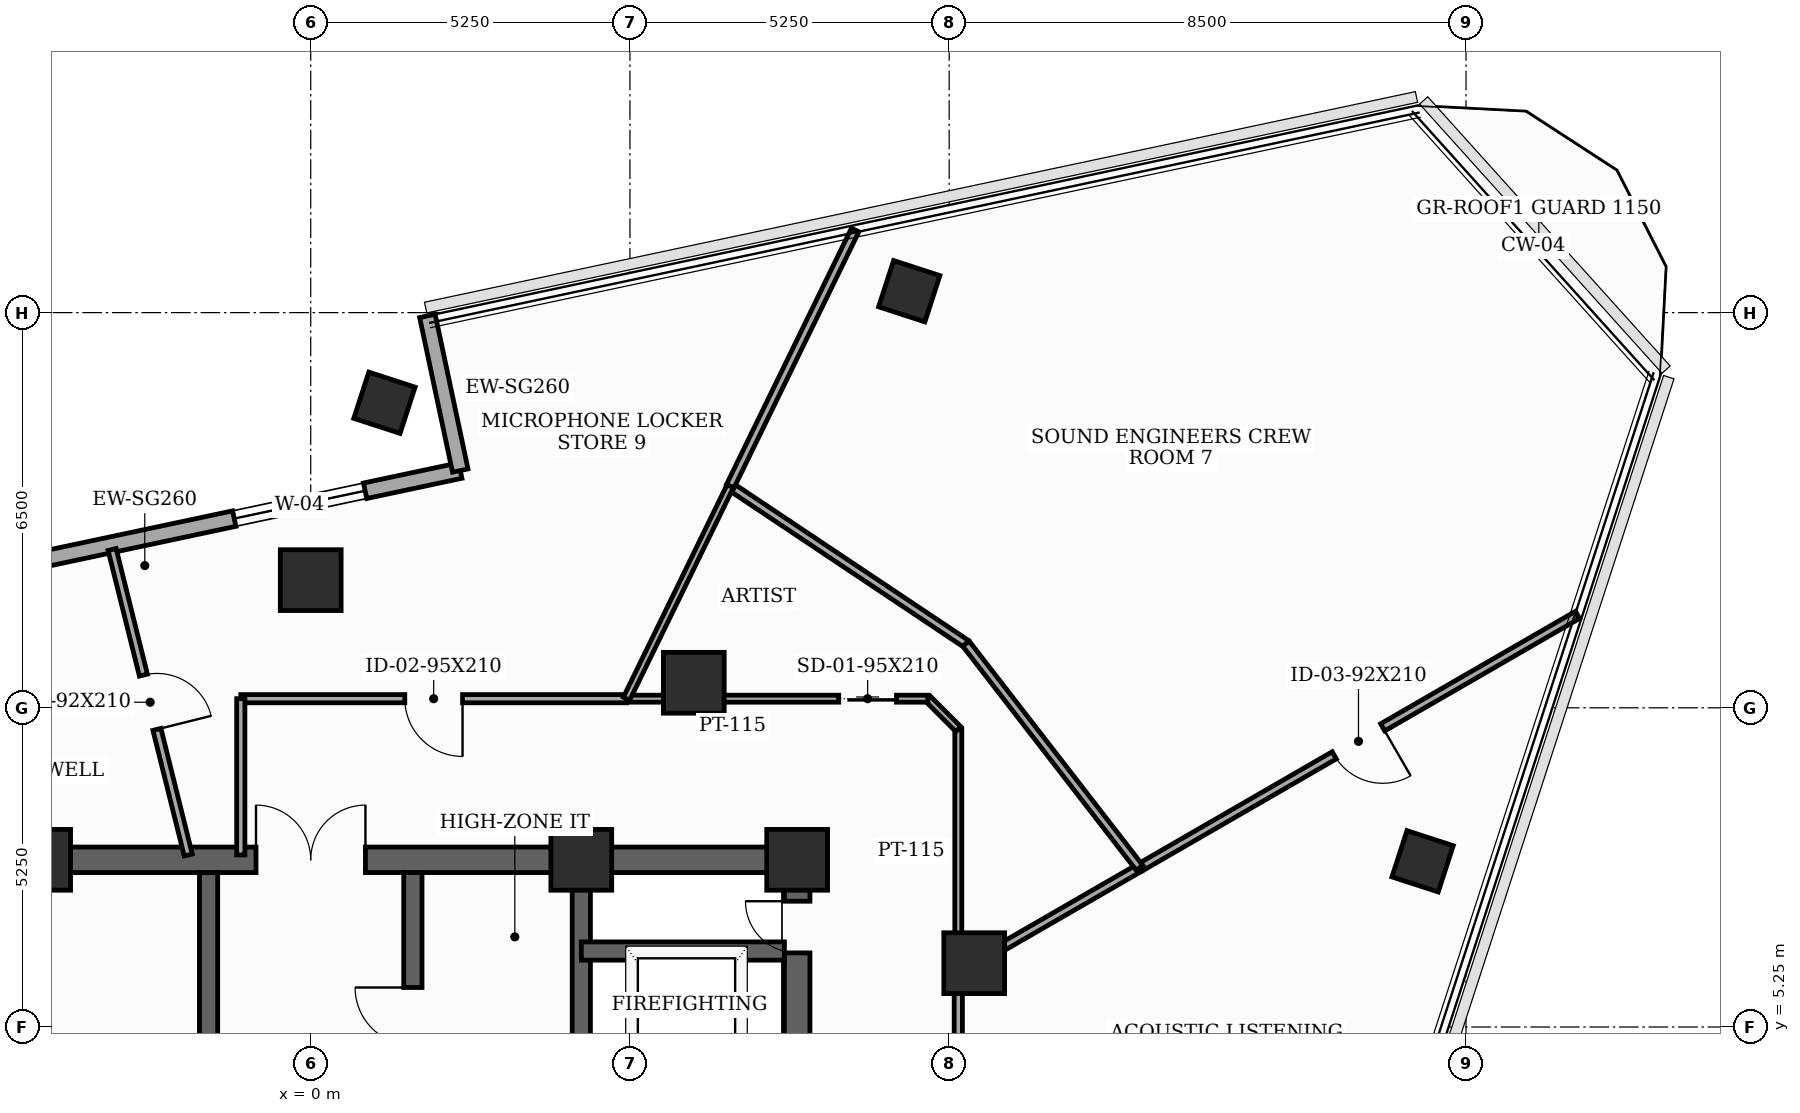
"""IFC4 building model, lengths in metres.
Left out: names, types, materials, properties, quantities, classifications, styles, units other than length and angle.
Written with IfcOpenShell. Run it as: python <this file> out.ifc"""

import sys

from ifc_helpers import new_model, si_unit, direction, frame, frame_2d, origin, origin_2d, place, context, subcontext, project, spatial, rectangle, extrude, element, fill, save


model = new_model("IFC4")
c1 = context("Model", 3, precision=1e-05, world=origin(), true_north=direction((0.0, 1.0)))
c2 = subcontext(c1, "Body", "Model", "MODEL_VIEW")
j1 = project(units=[si_unit("LENGTHUNIT", "METRE"), si_unit("PLANEANGLEUNIT", "RADIAN")], contexts=[c1])
p1 = place(None, origin())
s1 = spatial("IfcSite", under=j1, at=p1, CompositionType="ELEMENT")
p2 = place(p1, origin())
s2 = spatial("IfcBuilding", under=s1, at=p2, CompositionType="ELEMENT")
p3 = place(p2, frame((0.0, 0.0, 305.4)))
s3 = spatial("IfcBuildingStorey", under=s2, at=p3, CompositionType="ELEMENT", Elevation=305.4)
for number, where, z_axis, x_axis in (
    (1, (8.0, 8.0, 0.0), (0.0, 0.0, 1.0), (1.0, 0.0, 0.0)),
    (2, (4.45, 8.0, 0.0), (0.0, 0.0, 1.0), (1.0, 0.0, 0.0)),
    (3, (-4.45, 8.0, 0.0), (0.0, 0.0, 1.0), (1.0, 0.0, 0.0)),
    (4, (10.912, 6.3, 0.0), (0.0, 0.0, 1.0), (1.0, 0.0, 0.0)),
    (5, (6.3, 10.912, 0.0), (0.0, 0.0, 1.0), (1.0, 0.0, 0.0)),
    (6, (0.0, 12.6, 0.0), (0.0, 0.0, 1.0), (1.0, 0.0, 0.0)),
):
    element("IfcColumn", number, at=place(p3, frame(where, z_axis=z_axis, x_axis=x_axis)), inside=s3, PredefinedType="COLUMN", context=c2, shape_type="SweptSolid", body=[
        extrude(rectangle(XDim=1.0, YDim=1.0, at=origin_2d()), origin(), (0.0, 0.0, 1.0), 3.7),
    ])
for number, where, z_axis, x_axis in (
    (7, (18.286, 7.976, 0.0), (0.0, 0.0, 1.0), (0.309, 0.951, 0.0)),
    (8, (9.844, 17.352, 0.0), (0.0, 0.0, 1.0), (0.309, 0.951, 0.0)),
    (9, (1.212, 15.518, 0.0), (0.0, 0.0, 1.0), (0.309, 0.951, 0.0)),
):
    element("IfcColumn", number, at=place(p3, frame(where, z_axis=z_axis, x_axis=x_axis)), inside=s3, PredefinedType="COLUMN", context=c2, shape_type="SweptSolid", body=[
        extrude(rectangle(XDim=0.8, YDim=0.8, at=origin_2d()), origin(), (0.0, 0.0, 1.0), 3.7),
    ])
p4 = place(p3, frame((2.459, 14.402, 0.0), z_axis=(0.0, 0.0, 1.0), x_axis=(-0.978149082982, -0.207904717268, 0.0)))
e10 = element("IfcWall", 10, at=p4, inside=s3, PredefinedType="SOLIDWALL", context=c2, shape_type="SweptSolid", body=[
    extrude(rectangle(XDim=10.8, YDim=0.26, at=frame_2d((5.4, 0.0))), origin(), (0.0, 0.0, 1.0), 3.5),
])
p5 = place(p4, frame((1.6, 0.0, 0.85)))
e11 = element("IfcOpeningElement", 11, at=p5, cuts=e10, PredefinedType="OPENING", context=c2, shape_type="SweptSolid", body=[
    extrude(rectangle(XDim=2.2, YDim=1.25, at=frame_2d((1.1, 0.625))), frame((0.0, 0.14, 0.0), z_axis=(0.0, -1.0, 0.0), x_axis=(1.0, 0.0, 0.0)), (0.0, 0.0, 1.0), 0.28),
])
p6 = place(p4, frame((7.0, 0.0, 0.85)))
e12 = element("IfcOpeningElement", 12, at=p6, cuts=e10, PredefinedType="OPENING", context=c2, shape_type="SweptSolid", body=[
    extrude(rectangle(XDim=2.2, YDim=1.25, at=frame_2d((1.1, 0.625))), frame((0.0, 0.14, 0.0), z_axis=(0.0, -1.0, 0.0), x_axis=(1.0, 0.0, 0.0)), (0.0, 0.0, 1.0), 0.28),
])
p7 = place(p3, frame((1.919, 16.946, 0.0), z_axis=(0.0, 0.0, 1.0), x_axis=(0.207893569688, -0.978151452323, 0.0)))
e13 = element("IfcWall", 13, at=p7, inside=s3, PredefinedType="SOLIDWALL", context=c2, shape_type="SweptSolid", body=[
    extrude(rectangle(XDim=2.6, YDim=0.26, at=frame_2d((1.3, 0.0))), origin(), (0.0, 0.0, 1.0), 3.5),
])
p8 = place(p3, frame((8.0, -8.0, 0.0), z_axis=(0.0, 0.0, 1.0), x_axis=(0.0, 1.0, 0.0)))
e14 = element("IfcWall", 14, at=p8, inside=s3, PredefinedType="SHEAR", context=c2, shape_type="SweptSolid", body=[
    extrude(rectangle(XDim=16.0, YDim=0.42, at=frame_2d((8.0, 0.0))), origin(), (0.0, 0.0, 1.0), 3.5),
])
p9 = place(p8, frame((9.6, 0.0, 0.0)))
e15 = element("IfcOpeningElement", 15, at=p9, cuts=e14, PredefinedType="OPENING", context=c2, shape_type="SweptSolid", body=[
    extrude(rectangle(XDim=1.05, YDim=2.15, at=frame_2d((0.525, 1.075))), frame((0.0, 0.22, 0.0), z_axis=(0.0, -1.0, 0.0), x_axis=(1.0, 0.0, 0.0)), (0.0, 0.0, 1.0), 0.44),
])
p10 = place(p8, frame((14.469, 0.0, 0.0)))
e16 = element("IfcOpeningElement", 16, at=p10, cuts=e14, PredefinedType="OPENING", context=c2, shape_type="SweptSolid", body=[
    extrude(rectangle(XDim=0.85, YDim=2.02, at=frame_2d((0.425, 1.01))), frame((0.0, 0.22, 0.0), z_axis=(0.0, -1.0, 0.0), x_axis=(1.0, 0.0, 0.0)), (0.0, 0.0, 1.0), 0.44),
])
p11 = place(p3, frame((-8.0, 8.0, 0.0), z_axis=(0.0, 0.0, 1.0), x_axis=(1.0, 0.0, 0.0)))
e17 = element("IfcWall", 17, at=p11, inside=s3, PredefinedType="SHEAR", context=c2, shape_type="SweptSolid", body=[
    extrude(rectangle(XDim=16.0, YDim=0.42, at=frame_2d((8.0, 0.0))), origin(), (0.0, 0.0, 1.0), 3.5),
])
p12 = place(p11, frame((7.1, 0.0, 0.0)))
e18 = element("IfcOpeningElement", 18, at=p12, cuts=e17, PredefinedType="OPENING", context=c2, shape_type="SweptSolid", body=[
    extrude(rectangle(XDim=1.8, YDim=2.15, at=frame_2d((0.9, 1.075))), frame((0.0, 0.22, 0.0), z_axis=(0.0, -1.0, 0.0), x_axis=(1.0, 0.0, 0.0)), (0.0, 0.0, 1.0), 0.44),
])
p13 = place(p3, frame((4.45, -7.79, 0.0), z_axis=(0.0, 0.0, 1.0), x_axis=(0.0, 1.0, 0.0)))
e19 = element("IfcWall", 19, at=p13, inside=s3, PredefinedType="SHEAR", context=c2, shape_type="SweptSolid", body=[
    extrude(rectangle(XDim=15.58, YDim=0.3, at=frame_2d((7.79, 0.0))), origin(), (0.0, 0.0, 1.0), 3.5),
])
p14 = place(p3, frame((4.45, 6.5, 0.0), z_axis=(0.0, 0.0, 1.0), x_axis=(1.0, 0.0, 0.0)))
e20 = element("IfcWall", 20, at=p14, inside=s3, PredefinedType="SHEAR", context=c2, shape_type="SweptSolid", body=[
    extrude(rectangle(XDim=3.34, YDim=0.3, at=frame_2d((1.67, 0.0))), origin(), (0.0, 0.0, 1.0), 3.5),
])
p15 = place(p3, frame((-1.68, -4.85, 0.0), z_axis=(0.0, 0.0, 1.0), x_axis=(0.0, 1.0, 0.0)))
e21 = element("IfcWall", 21, at=p15, inside=s3, PredefinedType="SHEAR", context=c2, shape_type="SweptSolid", body=[
    extrude(rectangle(XDim=12.64, YDim=0.3, at=frame_2d((6.32, 0.0))), origin(), (0.0, 0.0, 1.0), 3.5),
])
p16 = place(p15, frame((1.05, 0.0, 0.0)))
e22 = element("IfcOpeningElement", 22, at=p16, cuts=e21, PredefinedType="OPENING", context=c2, shape_type="SweptSolid", body=[
    extrude(rectangle(XDim=0.85, YDim=2.02, at=frame_2d((0.425, 1.01))), frame((0.0, 0.16, 0.0), z_axis=(0.0, -1.0, 0.0), x_axis=(1.0, 0.0, 0.0)), (0.0, 0.0, 1.0), 0.32),
])
p17 = place(p15, frame((6.8, 0.0, 0.0)))
e23 = element("IfcOpeningElement", 23, at=p17, cuts=e21, PredefinedType="OPENING", context=c2, shape_type="SweptSolid", body=[
    extrude(rectangle(XDim=0.95, YDim=2.1, at=frame_2d((0.475, 1.05))), frame((0.0, 0.16, 0.0), z_axis=(0.0, -1.0, 0.0), x_axis=(1.0, 0.0, 0.0)), (0.0, 0.0, 1.0), 0.32),
])
p18 = place(p3, frame((1.68, -4.85, 0.0), z_axis=(0.0, 0.0, 1.0), x_axis=(0.0, 1.0, 0.0)))
e24 = element("IfcWall", 24, at=p18, inside=s3, PredefinedType="SHEAR", context=c2, shape_type="SweptSolid", body=[
    extrude(rectangle(XDim=12.64, YDim=0.3, at=frame_2d((6.32, 0.0))), origin(), (0.0, 0.0, 1.0), 3.5),
])
p19 = place(p18, frame((0.55, 0.0, 0.0)))
e25 = element("IfcOpeningElement", 25, at=p19, cuts=e24, PredefinedType="OPENING", context=c2, shape_type="SweptSolid", body=[
    extrude(rectangle(XDim=1.1, YDim=2.1, at=frame_2d((0.55, 1.05))), frame((0.0, 0.16, 0.0), z_axis=(0.0, -1.0, 0.0), x_axis=(1.0, 0.0, 0.0)), (0.0, 0.0, 1.0), 0.32),
])
p20 = place(p18, frame((2.65, 0.0, 0.0)))
e26 = element("IfcOpeningElement", 26, at=p20, cuts=e24, PredefinedType="OPENING", context=c2, shape_type="SweptSolid", body=[
    extrude(rectangle(XDim=1.1, YDim=2.1, at=frame_2d((0.55, 1.05))), frame((0.0, 0.16, 0.0), z_axis=(0.0, -1.0, 0.0), x_axis=(1.0, 0.0, 0.0)), (0.0, 0.0, 1.0), 0.32),
])
p21 = place(p18, frame((4.75, 0.0, 0.0)))
e27 = element("IfcOpeningElement", 27, at=p21, cuts=e24, PredefinedType="OPENING", context=c2, shape_type="SweptSolid", body=[
    extrude(rectangle(XDim=1.1, YDim=2.1, at=frame_2d((0.55, 1.05))), frame((0.0, 0.16, 0.0), z_axis=(0.0, -1.0, 0.0), x_axis=(1.0, 0.0, 0.0)), (0.0, 0.0, 1.0), 0.32),
])
p22 = place(p18, frame((6.8, 0.0, 0.0)))
e28 = element("IfcOpeningElement", 28, at=p22, cuts=e24, PredefinedType="OPENING", context=c2, shape_type="SweptSolid", body=[
    extrude(rectangle(XDim=0.92, YDim=2.1, at=frame_2d((0.46, 1.05))), frame((0.0, 0.16, 0.0), z_axis=(0.0, -1.0, 0.0), x_axis=(1.0, 0.0, 0.0)), (0.0, 0.0, 1.0), 0.32),
])
p23 = place(p18, frame((9.8, 0.0, 0.0)))
e29 = element("IfcOpeningElement", 29, at=p23, cuts=e24, PredefinedType="OPENING", context=c2, shape_type="SweptSolid", body=[
    extrude(rectangle(XDim=0.95, YDim=2.1, at=frame_2d((0.475, 1.05))), frame((0.0, 0.16, 0.0), z_axis=(0.0, -1.0, 0.0), x_axis=(1.0, 0.0, 0.0)), (0.0, 0.0, 1.0), 0.32),
])
p24 = place(p3, frame((10.65, 2.45, 0.0), z_axis=(0.0, 0.0, 1.0), x_axis=(0.0, 1.0, 0.0)))
e30 = element("IfcWall", 30, at=p24, inside=s3, PredefinedType="PARTITIONING", context=c2, shape_type="SweptSolid", body=[
    extrude(rectangle(XDim=3.699, YDim=0.135, at=frame_2d((1.85, 0.0))), origin(), (0.0, 0.0, 1.0), 3.5),
])
p25 = place(p24, frame((0.561, 0.0, 0.0)))
e31 = element("IfcOpeningElement", 31, at=p25, cuts=e30, PredefinedType="OPENING", context=c2, shape_type="SweptSolid", body=[
    extrude(rectangle(XDim=0.95, YDim=2.1, at=frame_2d((0.475, 1.05))), frame((0.0, 0.077, 0.0), z_axis=(0.0, -1.0, 0.0), x_axis=(1.0, 0.0, 0.0)), (0.0, 0.0, 1.0), 0.155),
])
p26 = place(p3, frame((10.65, 6.149, 0.0), z_axis=(0.0, 0.0, 1.0), x_axis=(0.0, 1.0, 0.0)))
e32 = element("IfcWall", 32, at=p26, inside=s3, PredefinedType="PARTITIONING", context=c2, shape_type="SweptSolid", body=[
    extrude(rectangle(XDim=4.001, YDim=0.115, at=frame_2d((2.0, 0.0))), origin(), (0.0, 0.0, 1.0), 2.885),
])
p27 = place(p3, frame((10.65, 10.15, 0.0), z_axis=(0.0, 0.0, 1.0), x_axis=(-0.707106781187, 0.707106781187, 0.0)))
e33 = element("IfcWall", 33, at=p27, inside=s3, PredefinedType="PARTITIONING", context=c2, shape_type="SweptSolid", body=[
    extrude(rectangle(XDim=0.707, YDim=0.115, at=frame_2d((0.354, 0.0))), origin(), (0.0, 0.0, 1.0), 3.5),
])
p28 = place(p3, frame((10.15, 10.65, 0.0), z_axis=(0.0, 0.0, 1.0), x_axis=(-1.0, 0.0, 0.0)))
e34 = element("IfcWall", 34, at=p28, inside=s3, PredefinedType="PARTITIONING", context=c2, shape_type="SweptSolid", body=[
    extrude(rectangle(XDim=4.956, YDim=0.115, at=frame_2d((2.478, 0.0))), origin(), (0.0, 0.0, 1.0), 2.885),
])
p29 = place(p28, frame((0.516, 0.0, 0.0)))
e35 = element("IfcOpeningElement", 35, at=p29, cuts=e34, PredefinedType="OPENING", context=c2, shape_type="SweptSolid", body=[
    extrude(rectangle(XDim=0.95, YDim=2.1, at=frame_2d((0.475, 1.05))), frame((0.0, 0.067, 0.0), z_axis=(0.0, -1.0, 0.0), x_axis=(1.0, 0.0, 0.0)), (0.0, 0.0, 1.0), 0.135),
])
p30 = place(p3, frame((5.194, 10.65, 0.0), z_axis=(0.0, 0.0, 1.0), x_axis=(-1.0, 0.0, 0.0)))
e36 = element("IfcWall", 36, at=p30, inside=s3, PredefinedType="PARTITIONING", context=c2, shape_type="SweptSolid", body=[
    extrude(rectangle(XDim=6.344, YDim=0.135, at=frame_2d((3.172, 0.0))), origin(), (0.0, 0.0, 1.0), 2.885),
])
p31 = place(p30, frame((2.697, 0.0, 0.0)))
e37 = element("IfcOpeningElement", 37, at=p31, cuts=e36, PredefinedType="OPENING", context=c2, shape_type="SweptSolid", body=[
    extrude(rectangle(XDim=0.95, YDim=2.1, at=frame_2d((0.475, 1.05))), frame((0.0, 0.077, 0.0), z_axis=(0.0, -1.0, 0.0), x_axis=(1.0, 0.0, 0.0)), (0.0, 0.0, 1.0), 0.155),
])
p32 = place(p3, frame((-1.15, 10.65, 0.0), z_axis=(0.0, 0.0, 1.0), x_axis=(0.0, -1.0, 0.0)))
e38 = element("IfcWall", 38, at=p32, inside=s3, PredefinedType="PARTITIONING", context=c2, shape_type="SweptSolid", body=[
    extrude(rectangle(XDim=2.57, YDim=0.135, at=frame_2d((1.285, 0.0))), origin(), (0.0, 0.0, 1.0), 2.885),
])
p33 = place(p3, frame((20.833, 12.028, 0.0), z_axis=(0.0, 0.0, 1.0), x_axis=(-0.866007163819, -0.500031591216, 0.0)))
e39 = element("IfcWall", 39, at=p33, inside=s3, PredefinedType="PARTITIONING", context=c2, shape_type="SweptSolid", body=[
    extrude(rectangle(XDim=8.317, YDim=0.135, at=frame_2d((4.159, 0.0))), origin(), (0.0, 0.0, 1.0), 3.035),
])
p34 = place(p33, frame((3.698, 0.0, 0.0)))
e40 = element("IfcOpeningElement", 40, at=p34, cuts=e39, PredefinedType="OPENING", context=c2, shape_type="SweptSolid", body=[
    extrude(rectangle(XDim=0.92, YDim=2.1, at=frame_2d((0.46, 1.05))), frame((0.0, 0.077, 0.0), z_axis=(0.0, -1.0, 0.0), x_axis=(1.0, 0.0, 0.0)), (0.0, 0.0, 1.0), 0.155),
])
p35 = place(p3, frame((13.63, 7.869, 0.0), z_axis=(0.0, 0.0, 1.0), x_axis=(-0.866091067331, -0.499886250151, 0.0)))
e41 = element("IfcWall", 41, at=p35, inside=s3, PredefinedType="PARTITIONING", context=c2, shape_type="SweptSolid", body=[
    extrude(rectangle(XDim=3.441, YDim=0.135, at=frame_2d((1.72, 0.0))), origin(), (0.0, 0.0, 1.0), 2.885),
])
p36 = place(p3, frame((6.899, 14.145, 0.0), z_axis=(0.0, 0.0, 1.0), x_axis=(0.831510168033, -0.555509532283, 0.0)))
e42 = element("IfcWall", 42, at=p36, inside=s3, PredefinedType="PARTITIONING", context=c2, shape_type="SweptSolid", body=[
    extrude(rectangle(XDim=4.663, YDim=0.135, at=frame_2d((2.331, 0.0))), origin(), (0.0, 0.0, 1.0), 3.035),
])
p37 = place(p3, frame((10.776, 11.555, 0.0), z_axis=(0.0, 0.0, 1.0), x_axis=(0.612213330569, -0.790692631731, 0.0)))
e43 = element("IfcWall", 43, at=p37, inside=s3, PredefinedType="PARTITIONING", context=c2, shape_type="SweptSolid", body=[
    extrude(rectangle(XDim=4.662, YDim=0.135, at=frame_2d((2.331, 0.0))), origin(), (0.0, 0.0, 1.0), 3.215),
])
p38 = place(p3, frame((8.954, 18.359, 0.0), z_axis=(0.0, 0.0, 1.0), x_axis=(-0.438339504666, -0.898809478504, 0.0)))
e44 = element("IfcWall", 44, at=p38, inside=s3, PredefinedType="PARTITIONING", context=c2, shape_type="SweptSolid", body=[
    extrude(rectangle(XDim=4.688, YDim=0.135, at=frame_2d((2.344, 0.0))), origin(), (0.0, 0.0, 1.0), 3.035),
])
p39 = place(p3, frame((6.899, 14.145, 0.0), z_axis=(0.0, 0.0, 1.0), x_axis=(-0.438402604201, -0.898778702813, 0.0)))
e45 = element("IfcWall", 45, at=p39, inside=s3, PredefinedType="PARTITIONING", context=c2, shape_type="SweptSolid", body=[
    extrude(rectangle(XDim=3.889, YDim=0.115, at=frame_2d((1.944, 0.0))), origin(), (0.0, 0.0, 1.0), 2.885),
])
p40 = place(p3, frame((-3.267, 13.104, 0.0), z_axis=(0.0, 0.0, 1.0), x_axis=(0.241825418424, -0.970319775643, 0.0)))
e46 = element("IfcWall", 46, at=p40, inside=s3, PredefinedType="PARTITIONING", context=c2, shape_type="SweptSolid", body=[
    extrude(rectangle(XDim=5.177, YDim=0.135, at=frame_2d((2.588, 0.0))), origin(), (0.0, 0.0, 1.0), 2.885),
])
p41 = place(p40, frame((2.129, 0.0, 0.0)))
e47 = element("IfcOpeningElement", 47, at=p41, cuts=e46, PredefinedType="OPENING", context=c2, shape_type="SweptSolid", body=[
    extrude(rectangle(XDim=0.92, YDim=2.1, at=frame_2d((0.46, 1.05))), frame((0.0, 0.077, 0.0), z_axis=(0.0, -1.0, 0.0), x_axis=(1.0, 0.0, 0.0)), (0.0, 0.0, 1.0), 0.155),
])
p42 = place(p5, origin())
e48 = element("IfcWindow", 48, at=p42, inside=s3, PartitioningType="SINGLE_PANEL", PredefinedType="WINDOW", context=c2, shape_type="SweptSolid", body=[
    extrude(rectangle(XDim=2.2, YDim=1.25, at=frame_2d((1.1, 0.625))), frame((0.0, 0.03, 0.0), z_axis=(0.0, -1.0, 0.0), x_axis=(1.0, 0.0, 0.0)), (0.0, 0.0, 1.0), 0.06),
])
fill(e11, e48)
p43 = place(p10, origin())
e49 = element("IfcDoor", 49, at=p43, inside=s3, OperationType="SINGLE_SWING_RIGHT", PredefinedType="TRAPDOOR", context=c2, shape_type="SweptSolid", body=[
    extrude(rectangle(XDim=0.85, YDim=2.02, at=frame_2d((0.425, 1.01))), frame((0.0, 0.025, 0.0), z_axis=(0.0, -1.0, 0.0), x_axis=(1.0, 0.0, 0.0)), (0.0, 0.0, 1.0), 0.05),
])
fill(e16, e49)
p44 = place(p12, origin())
e50 = element("IfcDoor", 50, at=p44, inside=s3, OperationType="DOUBLE_DOOR_SINGLE_SWING", PredefinedType="DOOR", context=c2, shape_type="SweptSolid", body=[
    extrude(rectangle(XDim=1.8, YDim=2.15, at=frame_2d((0.9, 1.075))), frame((0.0, 0.025, 0.0), z_axis=(0.0, -1.0, 0.0), x_axis=(1.0, 0.0, 0.0)), (0.0, 0.0, 1.0), 0.05),
])
fill(e18, e50)
p45 = place(p23, origin())
e51 = element("IfcDoor", 51, at=p45, inside=s3, OperationType="SINGLE_SWING_RIGHT", PredefinedType="DOOR", context=c2, shape_type="SweptSolid", body=[
    extrude(rectangle(XDim=0.95, YDim=2.1, at=frame_2d((0.475, 1.05))), frame((0.0, 0.025, 0.0), z_axis=(0.0, -1.0, 0.0), x_axis=(1.0, 0.0, 0.0)), (0.0, 0.0, 1.0), 0.05),
])
fill(e29, e51)
p46 = place(p29, origin())
e52 = element("IfcDoor", 52, at=p46, inside=s3, OperationType="SLIDING_TO_LEFT", PredefinedType="DOOR", context=c2, shape_type="SweptSolid", body=[
    extrude(rectangle(XDim=0.95, YDim=2.1, at=frame_2d((0.475, 1.05))), frame((0.0, 0.025, 0.0), z_axis=(0.0, -1.0, 0.0), x_axis=(1.0, 0.0, 0.0)), (0.0, 0.0, 1.0), 0.05),
])
fill(e35, e52)
p47 = place(p31, origin())
e53 = element("IfcDoor", 53, at=p47, inside=s3, OperationType="SINGLE_SWING_LEFT", PredefinedType="DOOR", context=c2, shape_type="SweptSolid", body=[
    extrude(rectangle(XDim=0.95, YDim=2.1, at=frame_2d((0.475, 1.05))), frame((0.0, 0.025, 0.0), z_axis=(0.0, -1.0, 0.0), x_axis=(1.0, 0.0, 0.0)), (0.0, 0.0, 1.0), 0.05),
])
fill(e37, e53)
p48 = place(p34, origin())
e54 = element("IfcDoor", 54, at=p48, inside=s3, OperationType="SINGLE_SWING_LEFT", PredefinedType="DOOR", context=c2, shape_type="SweptSolid", body=[
    extrude(rectangle(XDim=0.92, YDim=2.1, at=frame_2d((0.46, 1.05))), frame((0.0, 0.025, 0.0), z_axis=(0.0, -1.0, 0.0), x_axis=(1.0, 0.0, 0.0)), (0.0, 0.0, 1.0), 0.05),
])
fill(e40, e54)
p49 = place(p41, origin())
e55 = element("IfcDoor", 55, at=p49, inside=s3, OperationType="SINGLE_SWING_RIGHT", PredefinedType="DOOR", context=c2, shape_type="SweptSolid", body=[
    extrude(rectangle(XDim=0.92, YDim=2.1, at=frame_2d((0.46, 1.05))), frame((0.0, 0.025, 0.0), z_axis=(0.0, -1.0, 0.0), x_axis=(1.0, 0.0, 0.0)), (0.0, 0.0, 1.0), 0.05),
])
fill(e47, e55)
save(model, sys.argv[1])
